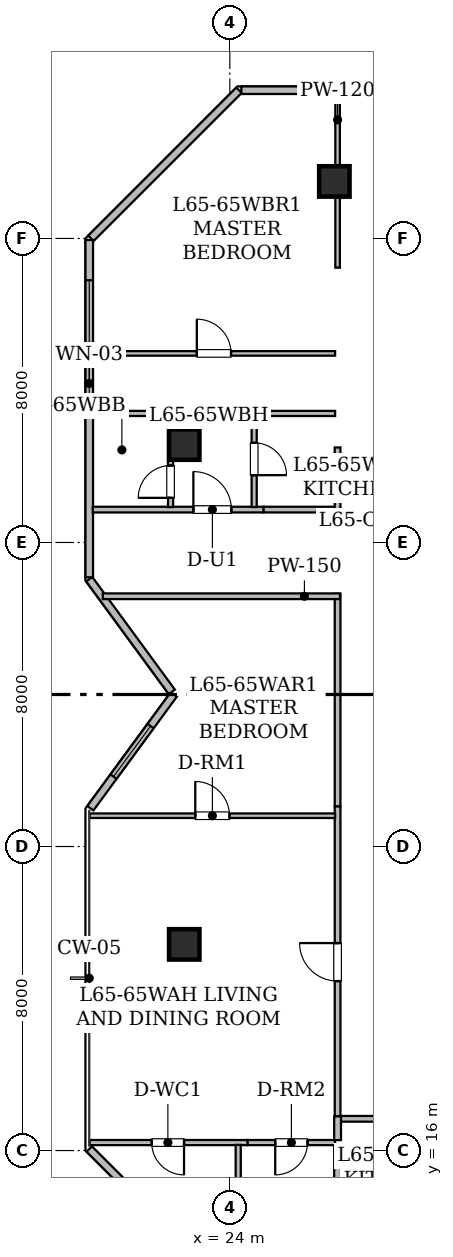
"""IFC4 building model, lengths in metres.
Left out: names, types, materials, properties, quantities, classifications, styles, units other than length and angle.
Written with IfcOpenShell. Run it as: python <this file> out.ifc"""

import sys

from ifc_helpers import new_model, si_unit, direction, frame, frame_2d, origin, origin_2d, place, context, subcontext, project, spatial, rectangle, hollow_rectangle, extrude, element, fill, save


model = new_model("IFC4")
c1 = context("Model", 3, precision=1e-05, world=origin(), true_north=direction((0.0, 1.0)))
c2 = subcontext(c1, "Body", "Model", "MODEL_VIEW")
j1 = project(units=[si_unit("LENGTHUNIT", "METRE"), si_unit("PLANEANGLEUNIT", "RADIAN")], contexts=[c1])
p1 = place(None, origin())
s1 = spatial("IfcSite", under=j1, at=p1, CompositionType="ELEMENT")
p2 = place(p1, origin())
s2 = spatial("IfcBuilding", under=s1, at=p2, CompositionType="ELEMENT")
p3 = place(p2, frame((0.0, 0.0, 253.7)))
s3 = spatial("IfcBuildingStorey", under=s2, at=p3, CompositionType="ELEMENT", Elevation=253.7)
for number, where, z_axis, x_axis in (
    (1, (26.75, 41.5, 0.0), (0.0, 0.0, 1.0), (1.0, 0.0, 0.0)),
    (2, (22.8, 21.425, 0.0), (0.0, 0.0, 1.0), (1.0, 0.0, 0.0)),
    (3, (22.8, 34.575, 0.0), (0.0, 0.0, 1.0), (1.0, 0.0, 0.0)),
):
    element("IfcColumn", number, at=place(p3, frame(where, z_axis=z_axis, x_axis=x_axis)), inside=s3, PredefinedType="COLUMN", context=c2, shape_type="SweptSolid", body=[
        extrude(hollow_rectangle(XDim=0.8, YDim=0.8, WallThickness=0.04, at=origin_2d()), origin(), (0.0, 0.0, 1.0), 3.65),
    ])
p4 = place(p3, frame((24.241, 12.1, 0.0), z_axis=(0.0, 0.0, 1.0), x_axis=(-0.707106781187, 0.707106781187, 0.0)))
e4 = element("IfcWall", 4, at=p4, inside=s3, PredefinedType="STANDARD", context=c2, shape_type="SweptSolid", body=[
    extrude(rectangle(XDim=5.573, YDim=0.2, at=frame_2d((2.787, 0.0))), origin(), (0.0, 0.0, 1.0), 3.43),
])
p5 = place(p3, frame((20.329, 25.007, 0.0), z_axis=(0.0, 0.0, 1.0), x_axis=(0.591366515379, 0.806402904564, 0.0)))
e5 = element("IfcWall", 5, at=p5, inside=s3, PredefinedType="STANDARD", context=c2, shape_type="SweptSolid", body=[
    extrude(rectangle(XDim=3.711, YDim=0.2, at=frame_2d((1.856, 0.0))), origin(), (0.0, 0.0, 1.0), 3.43),
])
p6 = place(p5, frame((1.031, 0.0, 0.85)))
e6 = element("IfcOpeningElement", 6, at=p6, cuts=e5, PredefinedType="OPENING", context=c2, shape_type="SweptSolid", body=[
    extrude(rectangle(XDim=1.65, YDim=1.55, at=frame_2d((0.825, 0.775))), frame((0.0, 0.11, 0.0), z_axis=(0.0, -1.0, 0.0), x_axis=(1.0, 0.0, 0.0)), (0.0, 0.0, 1.0), 0.22),
])
p7 = place(p3, frame((22.473, 28.069, 0.0), z_axis=(0.0, 0.0, 1.0), x_axis=(-0.591248456881, 0.80648946815, 0.0)))
e7 = element("IfcWall", 7, at=p7, inside=s3, PredefinedType="STANDARD", context=c2, shape_type="SweptSolid", body=[
    extrude(rectangle(XDim=3.675, YDim=0.2, at=frame_2d((1.837, 0.0))), origin(), (0.0, 0.0, 1.0), 3.43),
])
p8 = place(p3, frame((20.3, 31.084, 0.0), z_axis=(0.0, 0.0, 1.0), x_axis=(0.0, 1.0, 0.0)))
e8 = element("IfcWall", 8, at=p8, inside=s3, PredefinedType="STANDARD", context=c2, shape_type="SweptSolid", body=[
    extrude(rectangle(XDim=8.875, YDim=0.2, at=frame_2d((4.438, 0.0))), origin(), (0.0, 0.0, 1.0), 3.43),
])
p9 = place(p8, frame((4.501, 0.0, 0.8)))
e9 = element("IfcOpeningElement", 9, at=p9, cuts=e8, PredefinedType="OPENING", context=c2, shape_type="SweptSolid", body=[
    extrude(rectangle(XDim=1.2, YDim=1.5, at=frame_2d((0.6, 0.75))), frame((0.0, 0.11, 0.0), z_axis=(0.0, -1.0, 0.0), x_axis=(1.0, 0.0, 0.0)), (0.0, 0.0, 1.0), 0.22),
])
p10 = place(p8, frame((6.166, 0.0, 0.85)))
e10 = element("IfcOpeningElement", 10, at=p10, cuts=e8, PredefinedType="OPENING", context=c2, shape_type="SweptSolid", body=[
    extrude(rectangle(XDim=1.65, YDim=1.55, at=frame_2d((0.825, 0.775))), frame((0.0, 0.11, 0.0), z_axis=(0.0, -1.0, 0.0), x_axis=(1.0, 0.0, 0.0)), (0.0, 0.0, 1.0), 0.22),
])
p11 = place(p3, frame((20.344, 40.003, 0.0), z_axis=(0.0, 0.0, 1.0), x_axis=(0.707106781187, 0.707106781187, 0.0)))
e11 = element("IfcWall", 11, at=p11, inside=s3, PredefinedType="STANDARD", context=c2, shape_type="SweptSolid", body=[
    extrude(rectangle(XDim=5.511, YDim=0.2, at=frame_2d((2.756, 0.0))), origin(), (0.0, 0.0, 1.0), 3.43),
])
p12 = place(p3, frame((24.302, 43.9, 0.0), z_axis=(0.0, 0.0, 1.0), x_axis=(1.0, 0.0, 0.0)))
e12 = element("IfcWall", 12, at=p12, inside=s3, PredefinedType="STANDARD", context=c2, shape_type="SweptSolid", body=[
    extrude(rectangle(XDim=41.457, YDim=0.2, at=frame_2d((20.729, 0.0))), origin(), (0.0, 0.0, 1.0), 3.43),
])
p13 = place(p12, frame((4.673, 0.0, 0.85)))
e13 = element("IfcOpeningElement", 13, at=p13, cuts=e12, PredefinedType="OPENING", context=c2, shape_type="SweptSolid", body=[
    extrude(rectangle(XDim=1.65, YDim=1.55, at=frame_2d((0.825, 0.775))), frame((0.0, 0.11, 0.0), z_axis=(0.0, -1.0, 0.0), x_axis=(1.0, 0.0, 0.0)), (0.0, 0.0, 1.0), 0.22),
])
p14 = place(p12, frame((12.063, 0.0, 0.85)))
e14 = element("IfcOpeningElement", 14, at=p14, cuts=e12, PredefinedType="OPENING", context=c2, shape_type="SweptSolid", body=[
    extrude(rectangle(XDim=1.65, YDim=1.55, at=frame_2d((0.825, 0.775))), frame((0.0, 0.11, 0.0), z_axis=(0.0, -1.0, 0.0), x_axis=(1.0, 0.0, 0.0)), (0.0, 0.0, 1.0), 0.22),
])
p15 = place(p12, frame((14.905, 0.0, 0.85)))
e15 = element("IfcOpeningElement", 15, at=p15, cuts=e12, PredefinedType="OPENING", context=c2, shape_type="SweptSolid", body=[
    extrude(rectangle(XDim=1.65, YDim=1.55, at=frame_2d((0.825, 0.775))), frame((0.0, 0.11, 0.0), z_axis=(0.0, -1.0, 0.0), x_axis=(1.0, 0.0, 0.0)), (0.0, 0.0, 1.0), 0.22),
])
p16 = place(p12, frame((17.825, 0.0, 0.85)))
e16 = element("IfcOpeningElement", 16, at=p16, cuts=e12, PredefinedType="OPENING", context=c2, shape_type="SweptSolid", body=[
    extrude(rectangle(XDim=1.65, YDim=1.55, at=frame_2d((0.825, 0.775))), frame((0.0, 0.11, 0.0), z_axis=(0.0, -1.0, 0.0), x_axis=(1.0, 0.0, 0.0)), (0.0, 0.0, 1.0), 0.22),
])
p17 = place(p12, frame((20.176, 0.0, 0.8)))
e17 = element("IfcOpeningElement", 17, at=p17, cuts=e12, PredefinedType="OPENING", context=c2, shape_type="SweptSolid", body=[
    extrude(rectangle(XDim=1.2, YDim=1.5, at=frame_2d((0.6, 0.75))), frame((0.0, 0.11, 0.0), z_axis=(0.0, -1.0, 0.0), x_axis=(1.0, 0.0, 0.0)), (0.0, 0.0, 1.0), 0.22),
])
p18 = place(p12, frame((23.266, 0.0, 0.85)))
e18 = element("IfcOpeningElement", 18, at=p18, cuts=e12, PredefinedType="OPENING", context=c2, shape_type="SweptSolid", body=[
    extrude(rectangle(XDim=1.65, YDim=1.55, at=frame_2d((0.825, 0.775))), frame((0.0, 0.11, 0.0), z_axis=(0.0, -1.0, 0.0), x_axis=(1.0, 0.0, 0.0)), (0.0, 0.0, 1.0), 0.22),
])
p19 = place(p12, frame((27.324, 0.0, 0.85)))
e19 = element("IfcOpeningElement", 19, at=p19, cuts=e12, PredefinedType="OPENING", context=c2, shape_type="SweptSolid", body=[
    extrude(rectangle(XDim=1.65, YDim=1.55, at=frame_2d((0.825, 0.775))), frame((0.0, 0.11, 0.0), z_axis=(0.0, -1.0, 0.0), x_axis=(1.0, 0.0, 0.0)), (0.0, 0.0, 1.0), 0.22),
])
p20 = place(p12, frame((32.408, 0.0, 0.85)))
e20 = element("IfcOpeningElement", 20, at=p20, cuts=e12, PredefinedType="OPENING", context=c2, shape_type="SweptSolid", body=[
    extrude(rectangle(XDim=1.65, YDim=1.55, at=frame_2d((0.825, 0.775))), frame((0.0, 0.11, 0.0), z_axis=(0.0, -1.0, 0.0), x_axis=(1.0, 0.0, 0.0)), (0.0, 0.0, 1.0), 0.22),
])
p21 = place(p3, frame((26.835, 16.9, 0.0), z_axis=(0.0, 0.0, 1.0), x_axis=(0.0, 1.0, 0.0)))
e21 = element("IfcWall", 21, at=p21, inside=s3, PredefinedType="STANDARD", context=c2, shape_type="SweptSolid", body=[
    extrude(rectangle(XDim=8.159, YDim=0.15, at=frame_2d((4.08, 0.0))), origin(), (0.0, 0.0, 1.0), 2.725),
])
p22 = place(p21, frame((3.559, 0.0, 0.0)))
e22 = element("IfcOpeningElement", 22, at=p22, cuts=e21, PredefinedType="OPENING", context=c2, shape_type="SweptSolid", body=[
    extrude(rectangle(XDim=1.0, YDim=2.15, at=frame_2d((0.5, 1.075))), frame((0.0, 0.085, 0.0), z_axis=(0.0, -1.0, 0.0), x_axis=(1.0, 0.0, 0.0)), (0.0, 0.0, 1.0), 0.17),
])
p23 = place(p3, frame((26.835, 25.059, 0.0), z_axis=(0.0, 0.0, 1.0), x_axis=(0.0, 1.0, 0.0)))
e23 = element("IfcWall", 23, at=p23, inside=s3, PredefinedType="STANDARD", context=c2, shape_type="SweptSolid", body=[
    extrude(rectangle(XDim=5.591, YDim=0.15, at=frame_2d((2.795, 0.0))), origin(), (0.0, 0.0, 1.0), 3.43),
])
p24 = place(p3, frame((26.898, 30.585, 0.0), z_axis=(0.0, 0.0, 1.0), x_axis=(-1.0, 0.0, 0.0)))
e24 = element("IfcWall", 24, at=p24, inside=s3, PredefinedType="STANDARD", context=c2, shape_type="SweptSolid", body=[
    extrude(rectangle(XDim=6.242, YDim=0.15, at=frame_2d((3.121, 0.0))), origin(), (0.0, 0.0, 1.0), 2.887),
])
p25 = place(p3, frame((20.392, 32.865, 0.0), z_axis=(0.0, 0.0, 1.0), x_axis=(1.0, 0.0, 0.0)))
e25 = element("IfcWall", 25, at=p25, inside=s3, PredefinedType="STANDARD", context=c2, shape_type="SweptSolid", body=[
    extrude(rectangle(XDim=4.497, YDim=0.15, at=frame_2d((2.249, 0.0))), origin(), (0.0, 0.0, 1.0), 2.887),
])
p26 = place(p25, frame((2.648, 0.0, 0.0)))
e26 = element("IfcOpeningElement", 26, at=p26, cuts=e25, PredefinedType="OPENING", context=c2, shape_type="SweptSolid", body=[
    extrude(rectangle(XDim=1.0, YDim=2.15, at=frame_2d((0.5, 1.075))), frame((0.0, 0.085, 0.0), z_axis=(0.0, -1.0, 0.0), x_axis=(1.0, 0.0, 0.0)), (0.0, 0.0, 1.0), 0.17),
])
p27 = place(p3, frame((24.889, 32.865, 0.0), z_axis=(0.0, 0.0, 1.0), x_axis=(1.0, 0.0, 0.0)))
e27 = element("IfcWall", 27, at=p27, inside=s3, PredefinedType="STANDARD", context=c2, shape_type="SweptSolid", body=[
    extrude(rectangle(XDim=2.011, YDim=0.15, at=frame_2d((1.005, 0.0))), origin(), (0.0, 0.0, 1.0), 3.43),
])
p28 = place(p3, frame((26.835, 32.8, 0.0), z_axis=(0.0, 0.0, 1.0), x_axis=(0.0, 1.0, 0.0)))
e28 = element("IfcWall", 28, at=p28, inside=s3, PredefinedType="STANDARD", context=c2, shape_type="SweptSolid", body=[
    extrude(rectangle(XDim=1.7, YDim=0.15, at=frame_2d((0.85, 0.0))), origin(), (0.0, 0.0, 1.0), 3.013),
])
p29 = place(p3, frame((30.751, 16.835, 0.0), z_axis=(0.0, 0.0, 1.0), x_axis=(-1.0, 0.0, 0.0)))
e29 = element("IfcWall", 29, at=p29, inside=s3, PredefinedType="STANDARD", context=c2, shape_type="SweptSolid", body=[
    extrude(rectangle(XDim=3.851, YDim=0.15, at=frame_2d((1.926, 0.0))), origin(), (0.0, 0.0, 1.0), 2.725),
])
p30 = place(p3, frame((26.835, 39.23, 0.0), z_axis=(0.0, 0.0, 1.0), x_axis=(0.0, 1.0, 0.0)))
e30 = element("IfcWall", 30, at=p30, inside=s3, PredefinedType="PARTITIONING", context=c2, shape_type="SweptSolid", body=[
    extrude(rectangle(XDim=4.578, YDim=0.12, at=frame_2d((2.289, 0.0))), origin(), (0.0, 0.0, 1.0), 2.725),
])
p31 = place(p3, frame((24.469, 16.21, 0.0), z_axis=(0.0, 0.0, 1.0), x_axis=(-1.0, 0.0, 0.0)))
e31 = element("IfcWall", 31, at=p31, inside=s3, PredefinedType="PARTITIONING", context=c2, shape_type="SweptSolid", body=[
    extrude(rectangle(XDim=4.159, YDim=0.135, at=frame_2d((2.08, 0.0))), origin(), (0.0, 0.0, 1.0), 3.43),
])
p32 = place(p31, frame((1.675, 0.0, 0.0)))
e32 = element("IfcOpeningElement", 32, at=p32, cuts=e31, PredefinedType="OPENING", context=c2, shape_type="SweptSolid", body=[
    extrude(rectangle(XDim=0.85, YDim=2.1, at=frame_2d((0.425, 1.05))), frame((0.0, 0.077, 0.0), z_axis=(0.0, -1.0, 0.0), x_axis=(1.0, 0.0, 0.0)), (0.0, 0.0, 1.0), 0.155),
])
p33 = place(p3, frame((26.77, 16.21, 0.0), z_axis=(0.0, 0.0, 1.0), x_axis=(-1.0, 0.0, 0.0)))
e33 = element("IfcWall", 33, at=p33, inside=s3, PredefinedType="PARTITIONING", context=c2, shape_type="SweptSolid", body=[
    extrude(rectangle(XDim=2.301, YDim=0.135, at=frame_2d((1.15, 0.0))), origin(), (0.0, 0.0, 1.0), 2.887),
])
p34 = place(p33, frame((0.726, 0.0, 0.0)))
e34 = element("IfcOpeningElement", 34, at=p34, cuts=e33, PredefinedType="OPENING", context=c2, shape_type="SweptSolid", body=[
    extrude(rectangle(XDim=0.85, YDim=2.1, at=frame_2d((0.425, 1.05))), frame((0.0, 0.077, 0.0), z_axis=(0.0, -1.0, 0.0), x_axis=(1.0, 0.0, 0.0)), (0.0, 0.0, 1.0), 0.155),
])
p35 = place(p3, frame((20.31, 24.81, 0.0), z_axis=(0.0, 0.0, 1.0), x_axis=(1.0, 0.0, 0.0)))
e35 = element("IfcWall", 35, at=p35, inside=s3, PredefinedType="PARTITIONING", context=c2, shape_type="SweptSolid", body=[
    extrude(rectangle(XDim=6.46, YDim=0.12, at=frame_2d((3.23, 0.0))), origin(), (0.0, 0.0, 1.0), 2.887),
])
p36 = place(p35, frame((2.78, 0.0, 0.0)))
e36 = element("IfcOpeningElement", 36, at=p36, cuts=e35, PredefinedType="OPENING", context=c2, shape_type="SweptSolid", body=[
    extrude(rectangle(XDim=0.9, YDim=2.1, at=frame_2d((0.45, 1.05))), frame((0.0, 0.07, 0.0), z_axis=(0.0, -1.0, 0.0), x_axis=(1.0, 0.0, 0.0)), (0.0, 0.0, 1.0), 0.14),
])
p37 = place(p3, frame((26.835, 16.9, 0.0), z_axis=(0.0, 0.0, 1.0), x_axis=(0.0, -1.0, 0.0)))
e37 = element("IfcWall", 37, at=p37, inside=s3, PredefinedType="STANDARD", context=c2, shape_type="SweptSolid", body=[
    extrude(rectangle(XDim=0.625, YDim=0.18, at=frame_2d((0.312, 0.0))), origin(), (0.0, 0.0, 1.0), 3.43),
])
p38 = place(p3, frame((24.22, 16.149, 0.0), z_axis=(0.0, 0.0, 1.0), x_axis=(0.0, -1.0, 0.0)))
e38 = element("IfcWall", 38, at=p38, inside=s3, PredefinedType="PARTITIONING", context=c2, shape_type="SweptSolid", body=[
    extrude(rectangle(XDim=3.913, YDim=0.135, at=frame_2d((1.957, 0.0))), origin(), (0.0, 0.0, 1.0), 3.43),
])
p39 = place(p3, frame((26.835, 16.145, 0.0), z_axis=(0.0, 0.0, 1.0), x_axis=(0.0, -1.0, 0.0)))
e39 = element("IfcWall", 39, at=p39, inside=s3, PredefinedType="STANDARD", context=c2, shape_type="SweptSolid", body=[
    extrude(rectangle(XDim=1.636, YDim=0.18, at=frame_2d((0.818, 0.0))), origin(), (0.0, 0.0, 1.0), 2.725),
])
p40 = place(p3, frame((22.44, 32.932, 0.0), z_axis=(0.0, 0.0, 1.0), x_axis=(0.0, 1.0, 0.0)))
e40 = element("IfcWall", 40, at=p40, inside=s3, PredefinedType="PARTITIONING", context=c2, shape_type="SweptSolid", body=[
    extrude(rectangle(XDim=2.528, YDim=0.135, at=frame_2d((1.264, 0.0))), origin(), (0.0, 0.0, 1.0), 3.43),
])
p41 = place(p40, frame((0.242, 0.0, 0.0)))
e41 = element("IfcOpeningElement", 41, at=p41, cuts=e40, PredefinedType="OPENING", context=c2, shape_type="SweptSolid", body=[
    extrude(rectangle(XDim=0.85, YDim=2.1, at=frame_2d((0.425, 1.05))), frame((0.0, 0.077, 0.0), z_axis=(0.0, -1.0, 0.0), x_axis=(1.0, 0.0, 0.0)), (0.0, 0.0, 1.0), 0.155),
])
p42 = place(p3, frame((22.505, 35.395, 0.0), z_axis=(0.0, 0.0, 1.0), x_axis=(-1.0, 0.0, 0.0)))
e42 = element("IfcWall", 42, at=p42, inside=s3, PredefinedType="PARTITIONING", context=c2, shape_type="SweptSolid", body=[
    extrude(rectangle(XDim=2.113, YDim=0.135, at=frame_2d((1.056, 0.0))), origin(), (0.0, 0.0, 1.0), 3.43),
])
p43 = place(p3, frame((26.77, 35.395, 0.0), z_axis=(0.0, 0.0, 1.0), x_axis=(-1.0, 0.0, 0.0)))
e43 = element("IfcWall", 43, at=p43, inside=s3, PredefinedType="PARTITIONING", context=c2, shape_type="SweptSolid", body=[
    extrude(rectangle(XDim=2.195, YDim=0.135, at=frame_2d((1.098, 0.0))), origin(), (0.0, 0.0, 1.0), 2.725),
])
p44 = place(p3, frame((24.64, 35.46, 0.0), z_axis=(0.0, 0.0, 1.0), x_axis=(0.0, -1.0, 0.0)))
e44 = element("IfcWall", 44, at=p44, inside=s3, PredefinedType="PARTITIONING", context=c2, shape_type="SweptSolid", body=[
    extrude(rectangle(XDim=2.528, YDim=0.135, at=frame_2d((1.264, 0.0))), origin(), (0.0, 0.0, 1.0), 2.725),
])
p45 = place(p44, frame((0.839, 0.0, 0.0)))
e45 = element("IfcOpeningElement", 45, at=p45, cuts=e44, PredefinedType="OPENING", context=c2, shape_type="SweptSolid", body=[
    extrude(rectangle(XDim=0.85, YDim=2.1, at=frame_2d((0.425, 1.05))), frame((0.0, 0.077, 0.0), z_axis=(0.0, -1.0, 0.0), x_axis=(1.0, 0.0, 0.0)), (0.0, 0.0, 1.0), 0.155),
])
p46 = place(p3, frame((20.392, 36.975, 0.0), z_axis=(0.0, 0.0, 1.0), x_axis=(1.0, 0.0, 0.0)))
e46 = element("IfcWall", 46, at=p46, inside=s3, PredefinedType="PARTITIONING", context=c2, shape_type="SweptSolid", body=[
    extrude(rectangle(XDim=6.378, YDim=0.12, at=frame_2d((3.189, 0.0))), origin(), (0.0, 0.0, 1.0), 2.887),
])
p47 = place(p46, frame((2.739, 0.0, 0.0)))
e47 = element("IfcOpeningElement", 47, at=p47, cuts=e46, PredefinedType="OPENING", context=c2, shape_type="SweptSolid", body=[
    extrude(rectangle(XDim=0.9, YDim=2.1, at=frame_2d((0.45, 1.05))), frame((0.0, 0.07, 0.0), z_axis=(0.0, -1.0, 0.0), x_axis=(1.0, 0.0, 0.0)), (0.0, 0.0, 1.0), 0.14),
])
p48 = place(p6, origin())
e48 = element("IfcWindow", 48, at=p48, inside=s3, PartitioningType="SINGLE_PANEL", PredefinedType="WINDOW", context=c2, shape_type="SweptSolid", body=[
    extrude(rectangle(XDim=1.65, YDim=1.55, at=frame_2d((0.825, 0.775))), frame((0.0, 0.03, 0.0), z_axis=(0.0, -1.0, 0.0), x_axis=(1.0, 0.0, 0.0)), (0.0, 0.0, 1.0), 0.06),
])
fill(e6, e48)
p49 = place(p9, origin())
e49 = element("IfcWindow", 49, at=p49, inside=s3, PartitioningType="SINGLE_PANEL", PredefinedType="WINDOW", context=c2, shape_type="SweptSolid", body=[
    extrude(rectangle(XDim=1.2, YDim=1.5, at=frame_2d((0.6, 0.75))), frame((0.0, 0.03, 0.0), z_axis=(0.0, -1.0, 0.0), x_axis=(1.0, 0.0, 0.0)), (0.0, 0.0, 1.0), 0.06),
])
fill(e9, e49)
p50 = place(p10, origin())
e50 = element("IfcWindow", 50, at=p50, inside=s3, PartitioningType="SINGLE_PANEL", PredefinedType="WINDOW", context=c2, shape_type="SweptSolid", body=[
    extrude(rectangle(XDim=1.65, YDim=1.55, at=frame_2d((0.825, 0.775))), frame((0.0, 0.03, 0.0), z_axis=(0.0, -1.0, 0.0), x_axis=(1.0, 0.0, 0.0)), (0.0, 0.0, 1.0), 0.06),
])
fill(e10, e50)
p51 = place(p22, origin())
e51 = element("IfcDoor", 51, at=p51, inside=s3, OperationType="SINGLE_SWING_RIGHT", PredefinedType="DOOR", context=c2, shape_type="SweptSolid", body=[
    extrude(rectangle(XDim=1.0, YDim=2.15, at=frame_2d((0.5, 1.075))), frame((0.0, 0.025, 0.0), z_axis=(0.0, -1.0, 0.0), x_axis=(1.0, 0.0, 0.0)), (0.0, 0.0, 1.0), 0.05),
])
fill(e22, e51)
p52 = place(p26, origin())
e52 = element("IfcDoor", 52, at=p52, inside=s3, OperationType="SINGLE_SWING_LEFT", PredefinedType="DOOR", context=c2, shape_type="SweptSolid", body=[
    extrude(rectangle(XDim=1.0, YDim=2.15, at=frame_2d((0.5, 1.075))), frame((0.0, 0.025, 0.0), z_axis=(0.0, -1.0, 0.0), x_axis=(1.0, 0.0, 0.0)), (0.0, 0.0, 1.0), 0.05),
])
fill(e26, e52)
p53 = place(p32, origin())
e53 = element("IfcDoor", 53, at=p53, inside=s3, OperationType="SINGLE_SWING_LEFT", PredefinedType="DOOR", context=c2, shape_type="SweptSolid", body=[
    extrude(rectangle(XDim=0.85, YDim=2.1, at=frame_2d((0.425, 1.05))), frame((0.0, 0.025, 0.0), z_axis=(0.0, -1.0, 0.0), x_axis=(1.0, 0.0, 0.0)), (0.0, 0.0, 1.0), 0.05),
])
fill(e32, e53)
p54 = place(p34, origin())
e54 = element("IfcDoor", 54, at=p54, inside=s3, OperationType="SINGLE_SWING_RIGHT", PredefinedType="DOOR", context=c2, shape_type="SweptSolid", body=[
    extrude(rectangle(XDim=0.85, YDim=2.1, at=frame_2d((0.425, 1.05))), frame((0.0, 0.025, 0.0), z_axis=(0.0, -1.0, 0.0), x_axis=(1.0, 0.0, 0.0)), (0.0, 0.0, 1.0), 0.05),
])
fill(e34, e54)
p55 = place(p36, origin())
e55 = element("IfcDoor", 55, at=p55, inside=s3, OperationType="SINGLE_SWING_LEFT", PredefinedType="DOOR", context=c2, shape_type="SweptSolid", body=[
    extrude(rectangle(XDim=0.9, YDim=2.1, at=frame_2d((0.45, 1.05))), frame((0.0, 0.025, 0.0), z_axis=(0.0, -1.0, 0.0), x_axis=(1.0, 0.0, 0.0)), (0.0, 0.0, 1.0), 0.05),
])
fill(e36, e55)
p56 = place(p41, origin())
e56 = element("IfcDoor", 56, at=p56, inside=s3, OperationType="SINGLE_SWING_LEFT", PredefinedType="DOOR", context=c2, shape_type="SweptSolid", body=[
    extrude(rectangle(XDim=0.85, YDim=2.1, at=frame_2d((0.425, 1.05))), frame((0.0, 0.025, 0.0), z_axis=(0.0, -1.0, 0.0), x_axis=(1.0, 0.0, 0.0)), (0.0, 0.0, 1.0), 0.05),
])
fill(e41, e56)
p57 = place(p45, origin())
e57 = element("IfcDoor", 57, at=p57, inside=s3, OperationType="SINGLE_SWING_RIGHT", PredefinedType="DOOR", context=c2, shape_type="SweptSolid", body=[
    extrude(rectangle(XDim=0.85, YDim=2.1, at=frame_2d((0.425, 1.05))), frame((0.0, 0.025, 0.0), z_axis=(0.0, -1.0, 0.0), x_axis=(1.0, 0.0, 0.0)), (0.0, 0.0, 1.0), 0.05),
])
fill(e45, e57)
p58 = place(p47, origin())
e58 = element("IfcDoor", 58, at=p58, inside=s3, OperationType="SINGLE_SWING_LEFT", PredefinedType="DOOR", context=c2, shape_type="SweptSolid", body=[
    extrude(rectangle(XDim=0.9, YDim=2.1, at=frame_2d((0.45, 1.05))), frame((0.0, 0.025, 0.0), z_axis=(0.0, -1.0, 0.0), x_axis=(1.0, 0.0, 0.0)), (0.0, 0.0, 1.0), 0.05),
])
fill(e47, e58)
save(model, sys.argv[1])
